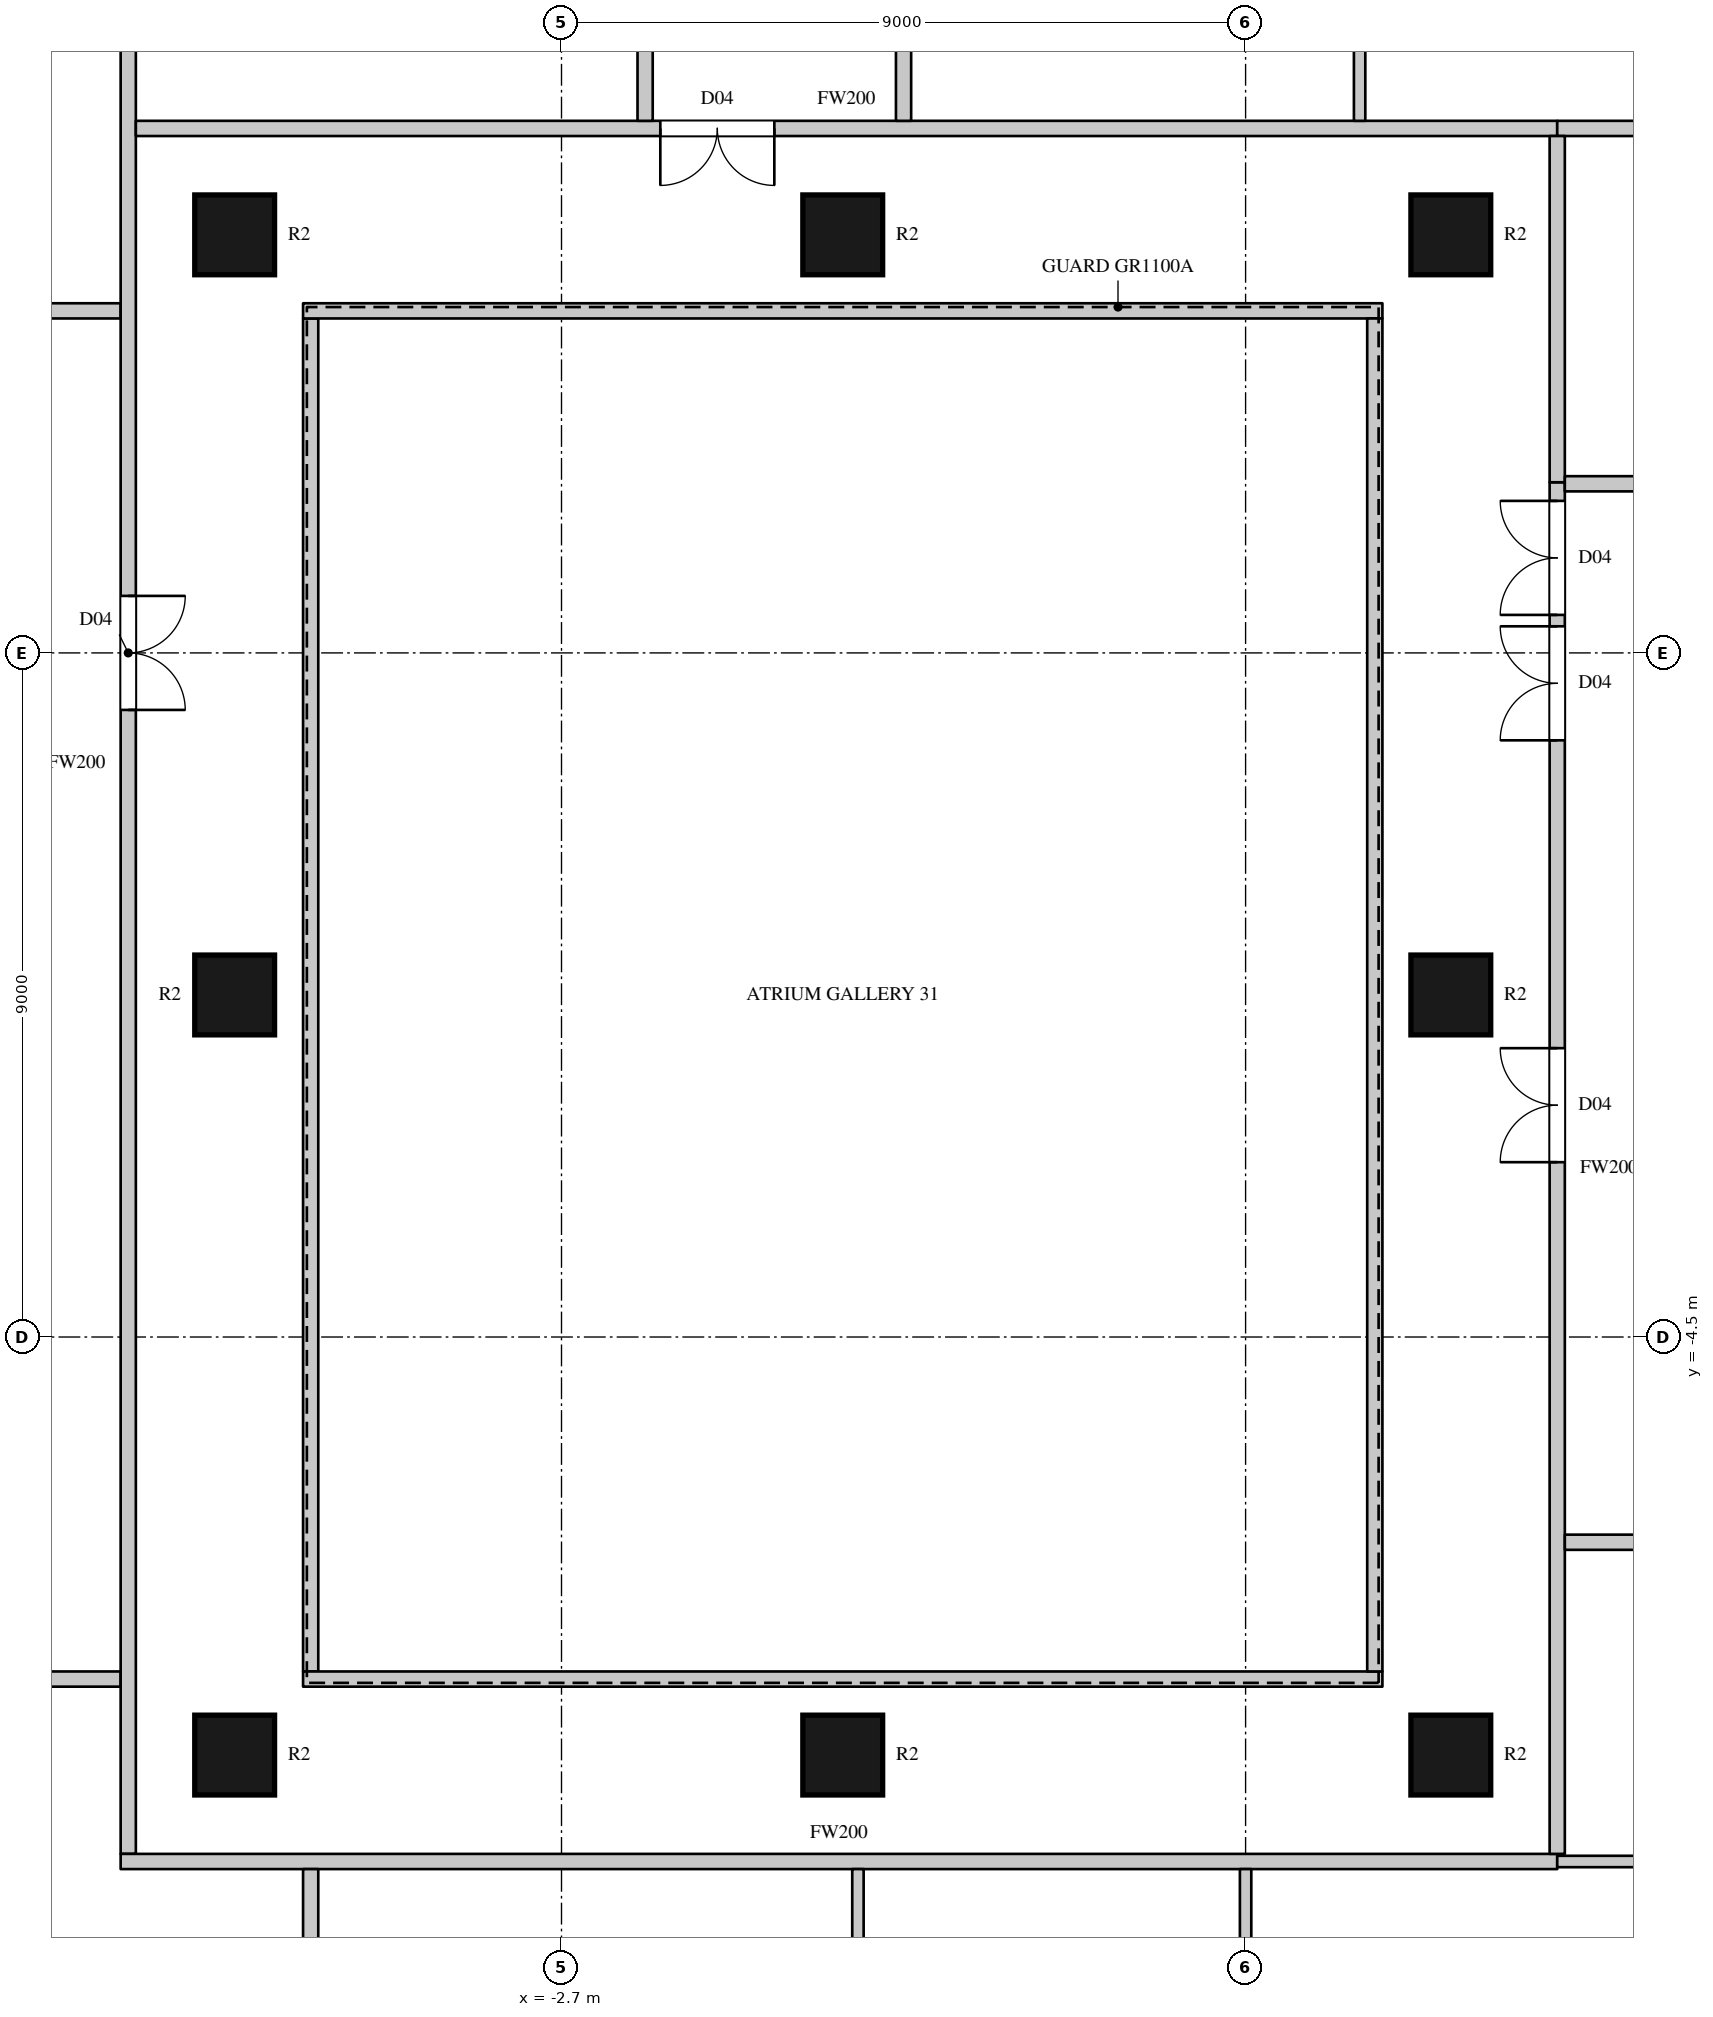
"""IFC4 building model, lengths in metres.
Left out: names, types, materials, properties, quantities, classifications, styles, units other than length and angle.
Written with IfcOpenShell. Run it as: python <this file> out.ifc"""

import sys

from ifc_helpers import new_model, si_unit, direction, frame, frame_2d, origin, origin_2d, place, context, subcontext, project, spatial, rectangle, circle, extrude, element, fill, save


model = new_model("IFC4")
c1 = context("Model", 3, precision=1e-05, world=origin(), true_north=direction((0.0, 1.0)))
c2 = subcontext(c1, "Body", "Model", "MODEL_VIEW")
j1 = project(units=[si_unit("LENGTHUNIT", "METRE"), si_unit("PLANEANGLEUNIT", "RADIAN")], contexts=[c1])
p1 = place(None, origin())
s1 = spatial("IfcSite", under=j1, at=p1, CompositionType="ELEMENT")
p2 = place(p1, origin())
s2 = spatial("IfcBuilding", under=s1, at=p2, CompositionType="ELEMENT")
p3 = place(p2, frame((0.0, 0.0, 141.9)))
s3 = spatial("IfcBuildingStorey", under=s2, at=p3, CompositionType="ELEMENT", Elevation=141.9)
for number, where, z_axis, x_axis in (
    (1, (-7.0, -10.0, 0.0), (0.0, 0.0, 1.0), (1.0, 0.0, 0.0)),
    (2, (-7.0, 0.0, 0.0), (0.0, 0.0, 1.0), (1.0, 0.0, 0.0)),
    (3, (-7.0, 10.0, 0.0), (0.0, 0.0, 1.0), (1.0, 0.0, 0.0)),
    (4, (1.0, -10.0, 0.0), (0.0, 0.0, 1.0), (1.0, 0.0, 0.0)),
    (5, (1.0, 10.0, 0.0), (0.0, 0.0, 1.0), (1.0, 0.0, 0.0)),
    (6, (9.0, -10.0, 0.0), (0.0, 0.0, 1.0), (1.0, 0.0, 0.0)),
    (7, (9.0, 0.0, 0.0), (0.0, 0.0, 1.0), (1.0, 0.0, 0.0)),
    (8, (9.0, 10.0, 0.0), (0.0, 0.0, 1.0), (1.0, 0.0, 0.0)),
):
    element("IfcColumn", number, at=place(p3, frame(where, z_axis=z_axis, x_axis=x_axis)), inside=s3, PredefinedType="COLUMN", context=c2, shape_type="SweptSolid", body=[
        extrude(circle(Radius=0.525, at=origin_2d()), origin(), (0.0, 0.0, 1.0), 3.6),
    ])
p4 = place(p3, frame((-13.97, -9.0, 0.0), z_axis=(0.0, 0.0, 1.0), x_axis=(1.0, 0.0, 0.0)))
e9 = element("IfcWall", 9, at=p4, inside=s3, PredefinedType="PARTITIONING", context=c2, shape_type="SweptSolid", body=[
    extrude(rectangle(XDim=5.47, YDim=0.2, at=frame_2d((2.735, 0.0))), origin(), (0.0, 0.0, 1.0), 3.3),
])
p5 = place(p4, frame((0.4, 0.0, 0.0)))
e10 = element("IfcOpeningElement", 10, at=p5, cuts=e9, PredefinedType="OPENING", context=c2, shape_type="SweptSolid", body=[
    extrude(rectangle(XDim=1.5, YDim=2.2, at=frame_2d((0.75, 1.1))), frame((0.0, 0.11, 0.0), z_axis=(0.0, -1.0, 0.0), x_axis=(1.0, 0.0, 0.0)), (0.0, 0.0, 1.0), 0.22),
])
p6 = place(p4, frame((2.05, 0.0, 0.0)))
e11 = element("IfcOpeningElement", 11, at=p6, cuts=e9, PredefinedType="OPENING", context=c2, shape_type="SweptSolid", body=[
    extrude(rectangle(XDim=1.5, YDim=2.2, at=frame_2d((0.75, 1.1))), frame((0.0, 0.11, 0.0), z_axis=(0.0, -1.0, 0.0), x_axis=(1.0, 0.0, 0.0)), (0.0, 0.0, 1.0), 0.22),
])
p7 = place(p3, frame((-13.97, 9.0, 0.0), z_axis=(0.0, 0.0, 1.0), x_axis=(1.0, 0.0, 0.0)))
e12 = element("IfcWall", 12, at=p7, inside=s3, PredefinedType="PARTITIONING", context=c2, shape_type="SweptSolid", body=[
    extrude(rectangle(XDim=5.47, YDim=0.2, at=frame_2d((2.735, 0.0))), origin(), (0.0, 0.0, 1.0), 3.3),
])
p8 = place(p3, frame((-8.4, -11.3, 0.0), z_axis=(0.0, 0.0, 1.0), x_axis=(0.0, 1.0, 0.0)))
e13 = element("IfcWall", 13, at=p8, inside=s3, PredefinedType="PARTITIONING", context=c2, shape_type="SweptSolid", body=[
    extrude(rectangle(XDim=28.7, YDim=0.2, at=frame_2d((14.35, 0.0))), origin(), (0.0, 0.0, 1.0), 3.3),
])
p9 = place(p8, frame((15.05, 0.0, 0.0)))
e14 = element("IfcOpeningElement", 14, at=p9, cuts=e13, PredefinedType="OPENING", context=c2, shape_type="SweptSolid", body=[
    extrude(rectangle(XDim=1.5, YDim=2.2, at=frame_2d((0.75, 1.1))), frame((0.0, 0.11, 0.0), z_axis=(0.0, -1.0, 0.0), x_axis=(1.0, 0.0, 0.0)), (0.0, 0.0, 1.0), 0.22),
])
p10 = place(p8, frame((26.95, 0.0, 0.0)))
e15 = element("IfcOpeningElement", 15, at=p10, cuts=e13, PredefinedType="OPENING", context=c2, shape_type="SweptSolid", body=[
    extrude(rectangle(XDim=1.6, YDim=2.4, at=frame_2d((0.8, 1.2))), frame((0.0, 0.11, 0.0), z_axis=(0.0, -1.0, 0.0), x_axis=(1.0, 0.0, 0.0)), (0.0, 0.0, 1.0), 0.22),
])
p11 = place(p3, frame((-8.5, -11.4, 0.0), z_axis=(0.0, 0.0, 1.0), x_axis=(1.0, 0.0, 0.0)))
e16 = element("IfcWall", 16, at=p11, inside=s3, PredefinedType="PARTITIONING", context=c2, shape_type="SweptSolid", body=[
    extrude(rectangle(XDim=18.9, YDim=0.2, at=frame_2d((9.45, 0.0))), origin(), (0.0, 0.0, 1.0), 3.3),
])
p12 = place(p3, frame((-8.3, 11.4, 0.0), z_axis=(0.0, 0.0, 1.0), x_axis=(1.0, 0.0, 0.0)))
e17 = element("IfcWall", 17, at=p12, inside=s3, PredefinedType="PARTITIONING", context=c2, shape_type="SweptSolid", body=[
    extrude(rectangle(XDim=18.7, YDim=0.2, at=frame_2d((9.35, 0.0))), origin(), (0.0, 0.0, 1.0), 3.3),
])
p13 = place(p12, frame((6.9, 0.0, 0.0)))
e18 = element("IfcOpeningElement", 18, at=p13, cuts=e17, PredefinedType="OPENING", context=c2, shape_type="SweptSolid", body=[
    extrude(rectangle(XDim=1.5, YDim=2.2, at=frame_2d((0.75, 1.1))), frame((0.0, 0.11, 0.0), z_axis=(0.0, -1.0, 0.0), x_axis=(1.0, 0.0, 0.0)), (0.0, 0.0, 1.0), 0.22),
])
p14 = place(p3, frame((-6.0, -17.4, 0.0), z_axis=(0.0, 0.0, 1.0), x_axis=(0.0, 1.0, 0.0)))
e19 = element("IfcWall", 19, at=p14, inside=s3, PredefinedType="PARTITIONING", context=c2, shape_type="SweptSolid", body=[
    extrude(rectangle(XDim=5.9, YDim=0.2, at=frame_2d((2.95, 0.0))), origin(), (0.0, 0.0, 1.0), 3.3),
])
p15 = place(p14, frame((0.15, 0.0, 0.0)))
e20 = element("IfcOpeningElement", 20, at=p15, cuts=e19, PredefinedType="OPENING", context=c2, shape_type="SweptSolid", body=[
    extrude(rectangle(XDim=0.95, YDim=2.2, at=frame_2d((0.475, 1.1))), frame((0.0, 0.11, 0.0), z_axis=(0.0, -1.0, 0.0), x_axis=(1.0, 0.0, 0.0)), (0.0, 0.0, 1.0), 0.22),
])
p16 = place(p3, frame((-6.0, -8.9, 0.0), z_axis=(0.0, 0.0, 1.0), x_axis=(0.0, 1.0, 0.0)))
e21 = element("IfcWall", 21, at=p16, inside=s3, PredefinedType="PARTITIONING", context=c2, shape_type="SweptSolid", body=[
    extrude(rectangle(XDim=17.8, YDim=0.2, at=frame_2d((8.9, 0.0))), origin(), (0.0, 0.0, 1.0), 3.3),
])
for number, where, z_axis, x_axis in (
    (22, (-6.1, -9.0, 0.0), (0.0, 0.0, 1.0), (1.0, 0.0, 0.0)),
    (23, (-6.1, 9.0, 0.0), (0.0, 0.0, 1.0), (1.0, 0.0, 0.0)),
):
    element("IfcWall", number, at=place(p3, frame(where, z_axis=z_axis, x_axis=x_axis)), inside=s3, PredefinedType="PARTITIONING", context=c2, shape_type="SweptSolid", body=[
        extrude(rectangle(XDim=14.2, YDim=0.2, at=frame_2d((7.1, 0.0))), origin(), (0.0, 0.0, 1.0), 3.3),
    ])
p17 = place(p3, frame((-1.6, 11.5, 0.0), z_axis=(0.0, 0.0, 1.0), x_axis=(0.0, 1.0, 0.0)))
e24 = element("IfcWall", 24, at=p17, inside=s3, PredefinedType="PARTITIONING", context=c2, shape_type="SweptSolid", body=[
    extrude(rectangle(XDim=5.9, YDim=0.2, at=frame_2d((2.95, 0.0))), origin(), (0.0, 0.0, 1.0), 3.3),
])
p18 = place(p3, frame((1.8, 11.5, 0.0), z_axis=(0.0, 0.0, 1.0), x_axis=(0.0, 1.0, 0.0)))
e25 = element("IfcWall", 25, at=p18, inside=s3, PredefinedType="PARTITIONING", context=c2, shape_type="SweptSolid", body=[
    extrude(rectangle(XDim=5.9, YDim=0.2, at=frame_2d((2.95, 0.0))), origin(), (0.0, 0.0, 1.0), 3.3),
])
p19 = place(p18, frame((4.15, 0.0, 0.0)))
e26 = element("IfcOpeningElement", 26, at=p19, cuts=e25, PredefinedType="OPENING", context=c2, shape_type="SweptSolid", body=[
    extrude(rectangle(XDim=1.6, YDim=2.4, at=frame_2d((0.8, 1.2))), frame((0.0, 0.11, 0.0), z_axis=(0.0, -1.0, 0.0), x_axis=(1.0, 0.0, 0.0)), (0.0, 0.0, 1.0), 0.22),
])
p20 = place(p3, frame((8.0, -8.9, 0.0), z_axis=(0.0, 0.0, 1.0), x_axis=(0.0, 1.0, 0.0)))
e27 = element("IfcWall", 27, at=p20, inside=s3, PredefinedType="PARTITIONING", context=c2, shape_type="SweptSolid", body=[
    extrude(rectangle(XDim=17.8, YDim=0.2, at=frame_2d((8.9, 0.0))), origin(), (0.0, 0.0, 1.0), 3.3),
])
p21 = place(p3, frame((10.4, -11.3, 0.0), z_axis=(0.0, 0.0, 1.0), x_axis=(0.0, 1.0, 0.0)))
e28 = element("IfcWall", 28, at=p21, inside=s3, PredefinedType="PARTITIONING", context=c2, shape_type="SweptSolid", body=[
    extrude(rectangle(XDim=18.045, YDim=0.2, at=frame_2d((9.022, 0.0))), origin(), (0.0, 0.0, 1.0), 3.3),
])
p22 = place(p21, frame((16.3, 0.0, 0.0)))
e29 = element("IfcOpeningElement", 29, at=p22, cuts=e28, PredefinedType="OPENING", context=c2, shape_type="SweptSolid", body=[
    extrude(rectangle(XDim=1.5, YDim=2.2, at=frame_2d((0.75, 1.1))), frame((0.0, 0.11, 0.0), z_axis=(0.0, -1.0, 0.0), x_axis=(1.0, 0.0, 0.0)), (0.0, 0.0, 1.0), 0.22),
])
p23 = place(p21, frame((14.65, 0.0, 0.0)))
e30 = element("IfcOpeningElement", 30, at=p23, cuts=e28, PredefinedType="OPENING", context=c2, shape_type="SweptSolid", body=[
    extrude(rectangle(XDim=1.5, YDim=2.2, at=frame_2d((0.75, 1.1))), frame((0.0, 0.11, 0.0), z_axis=(0.0, -1.0, 0.0), x_axis=(1.0, 0.0, 0.0)), (0.0, 0.0, 1.0), 0.22),
])
p24 = place(p21, frame((9.1, 0.0, 0.0)))
e31 = element("IfcOpeningElement", 31, at=p24, cuts=e28, PredefinedType="OPENING", context=c2, shape_type="SweptSolid", body=[
    extrude(rectangle(XDim=1.5, YDim=2.2, at=frame_2d((0.75, 1.1))), frame((0.0, 0.11, 0.0), z_axis=(0.0, -1.0, 0.0), x_axis=(1.0, 0.0, 0.0)), (0.0, 0.0, 1.0), 0.22),
])
p25 = place(p3, frame((10.5, -7.2, 0.0), z_axis=(0.0, 0.0, 1.0), x_axis=(1.0, 0.0, 0.0)))
e32 = element("IfcWall", 32, at=p25, inside=s3, PredefinedType="PARTITIONING", context=c2, shape_type="SweptSolid", body=[
    extrude(rectangle(XDim=5.7, YDim=0.2, at=frame_2d((2.85, 0.0))), origin(), (0.0, 0.0, 1.0), 3.3),
])
p26 = place(p25, frame((4.45, 0.0, 0.0)))
e33 = element("IfcOpeningElement", 33, at=p26, cuts=e32, PredefinedType="OPENING", context=c2, shape_type="SweptSolid", body=[
    extrude(rectangle(XDim=0.9, YDim=2.2, at=frame_2d((0.45, 1.1))), frame((0.0, 0.11, 0.0), z_axis=(0.0, -1.0, 0.0), x_axis=(1.0, 0.0, 0.0)), (0.0, 0.0, 1.0), 0.22),
])
p27 = place(p3, frame((1.2, -17.4, 0.0), z_axis=(0.0, 0.0, 1.0), x_axis=(0.0, 1.0, 0.0)))
e34 = element("IfcWall", 34, at=p27, inside=s3, PredefinedType="PARTITIONING", context=c2, shape_type="SweptSolid", body=[
    extrude(rectangle(XDim=5.9, YDim=0.15, at=frame_2d((2.95, 0.0))), origin(), (0.0, 0.0, 1.0), 3.3),
])
p28 = place(p3, frame((6.3, -16.975, 0.0), z_axis=(0.0, 0.0, 1.0), x_axis=(0.0, 1.0, 0.0)))
e35 = element("IfcWall", 35, at=p28, inside=s3, PredefinedType="PARTITIONING", context=c2, shape_type="SweptSolid", body=[
    extrude(rectangle(XDim=5.475, YDim=0.15, at=frame_2d((2.738, 0.0))), origin(), (0.0, 0.0, 1.0), 2.75),
])
p29 = place(p3, frame((7.8, 11.5, 0.0), z_axis=(0.0, 0.0, 1.0), x_axis=(0.0, 1.0, 0.0)))
e36 = element("IfcWall", 36, at=p29, inside=s3, PredefinedType="PARTITIONING", context=c2, shape_type="SweptSolid", body=[
    extrude(rectangle(XDim=5.9, YDim=0.15, at=frame_2d((2.95, 0.0))), origin(), (0.0, 0.0, 1.0), 3.3),
])
p30 = place(p3, frame((10.4, -11.4, 0.0), z_axis=(0.0, 0.0, 1.0), x_axis=(1.0, 0.0, 0.0)))
e37 = element("IfcWall", 37, at=p30, inside=s3, PredefinedType="PARTITIONING", context=c2, shape_type="SweptSolid", body=[
    extrude(rectangle(XDim=5.6, YDim=0.15, at=frame_2d((2.8, 0.0))), origin(), (0.0, 0.0, 1.0), 3.3),
])
p31 = place(p3, frame((10.4, 11.4, 0.0), z_axis=(0.0, 0.0, 1.0), x_axis=(1.0, 0.0, 0.0)))
e38 = element("IfcWall", 38, at=p31, inside=s3, PredefinedType="PARTITIONING", context=c2, shape_type="SweptSolid", body=[
    extrude(rectangle(XDim=5.6, YDim=0.2, at=frame_2d((2.8, 0.0))), origin(), (0.0, 0.0, 1.0), 3.3),
])
p32 = place(p3, frame((10.4, 6.745, 0.0), z_axis=(0.0, 0.0, 1.0), x_axis=(0.0, 1.0, 0.0)))
e39 = element("IfcWall", 39, at=p32, inside=s3, PredefinedType="PARTITIONING", context=c2, shape_type="SweptSolid", body=[
    extrude(rectangle(XDim=4.555, YDim=0.2, at=frame_2d((2.277, 0.0))), origin(), (0.0, 0.0, 1.0), 3.3),
])
p33 = place(p3, frame((10.5, 6.725, 0.0), z_axis=(0.0, 0.0, 1.0), x_axis=(1.0, 0.0, 0.0)))
e40 = element("IfcWall", 40, at=p33, inside=s3, PredefinedType="PARTITIONING", context=c2, shape_type="SweptSolid", body=[
    extrude(rectangle(XDim=5.7, YDim=0.2, at=frame_2d((2.85, 0.0))), origin(), (0.0, 0.0, 1.0), 3.3),
])
p34 = place(p33, frame((4.75, 0.0, 0.0)))
e41 = element("IfcOpeningElement", 41, at=p34, cuts=e40, PredefinedType="OPENING", context=c2, shape_type="SweptSolid", body=[
    extrude(rectangle(XDim=0.6, YDim=2.0, at=frame_2d((0.3, 1.0))), frame((0.0, 0.11, 0.0), z_axis=(0.0, -1.0, 0.0), x_axis=(1.0, 0.0, 0.0)), (0.0, 0.0, 1.0), 0.22),
])
p35 = place(p9, origin())
e42 = element("IfcDoor", 42, at=p35, inside=s3, OperationType="DOUBLE_DOOR_SINGLE_SWING", PredefinedType="DOOR", context=c2, shape_type="SweptSolid", body=[
    extrude(rectangle(XDim=1.5, YDim=2.2, at=frame_2d((0.75, 1.1))), frame((0.0, 0.025, 0.0), z_axis=(0.0, -1.0, 0.0), x_axis=(1.0, 0.0, 0.0)), (0.0, 0.0, 1.0), 0.05),
])
fill(e14, e42)
p36 = place(p13, origin())
e43 = element("IfcDoor", 43, at=p36, inside=s3, OperationType="DOUBLE_DOOR_SINGLE_SWING", PredefinedType="DOOR", context=c2, shape_type="SweptSolid", body=[
    extrude(rectangle(XDim=1.5, YDim=2.2, at=frame_2d((0.75, 1.1))), frame((0.0, 0.025, 0.0), z_axis=(0.0, -1.0, 0.0), x_axis=(1.0, 0.0, 0.0)), (0.0, 0.0, 1.0), 0.05),
])
fill(e18, e43)
p37 = place(p22, origin())
e44 = element("IfcDoor", 44, at=p37, inside=s3, OperationType="DOUBLE_DOOR_SINGLE_SWING", PredefinedType="DOOR", context=c2, shape_type="SweptSolid", body=[
    extrude(rectangle(XDim=1.5, YDim=2.2, at=frame_2d((0.75, 1.1))), frame((0.0, 0.025, 0.0), z_axis=(0.0, -1.0, 0.0), x_axis=(1.0, 0.0, 0.0)), (0.0, 0.0, 1.0), 0.05),
])
fill(e29, e44)
p38 = place(p23, origin())
e45 = element("IfcDoor", 45, at=p38, inside=s3, OperationType="DOUBLE_DOOR_SINGLE_SWING", PredefinedType="DOOR", context=c2, shape_type="SweptSolid", body=[
    extrude(rectangle(XDim=1.5, YDim=2.2, at=frame_2d((0.75, 1.1))), frame((0.0, 0.025, 0.0), z_axis=(0.0, -1.0, 0.0), x_axis=(1.0, 0.0, 0.0)), (0.0, 0.0, 1.0), 0.05),
])
fill(e30, e45)
p39 = place(p24, origin())
e46 = element("IfcDoor", 46, at=p39, inside=s3, OperationType="DOUBLE_DOOR_SINGLE_SWING", PredefinedType="DOOR", context=c2, shape_type="SweptSolid", body=[
    extrude(rectangle(XDim=1.5, YDim=2.2, at=frame_2d((0.75, 1.1))), frame((0.0, 0.025, 0.0), z_axis=(0.0, -1.0, 0.0), x_axis=(1.0, 0.0, 0.0)), (0.0, 0.0, 1.0), 0.05),
])
fill(e31, e46)
save(model, sys.argv[1])
